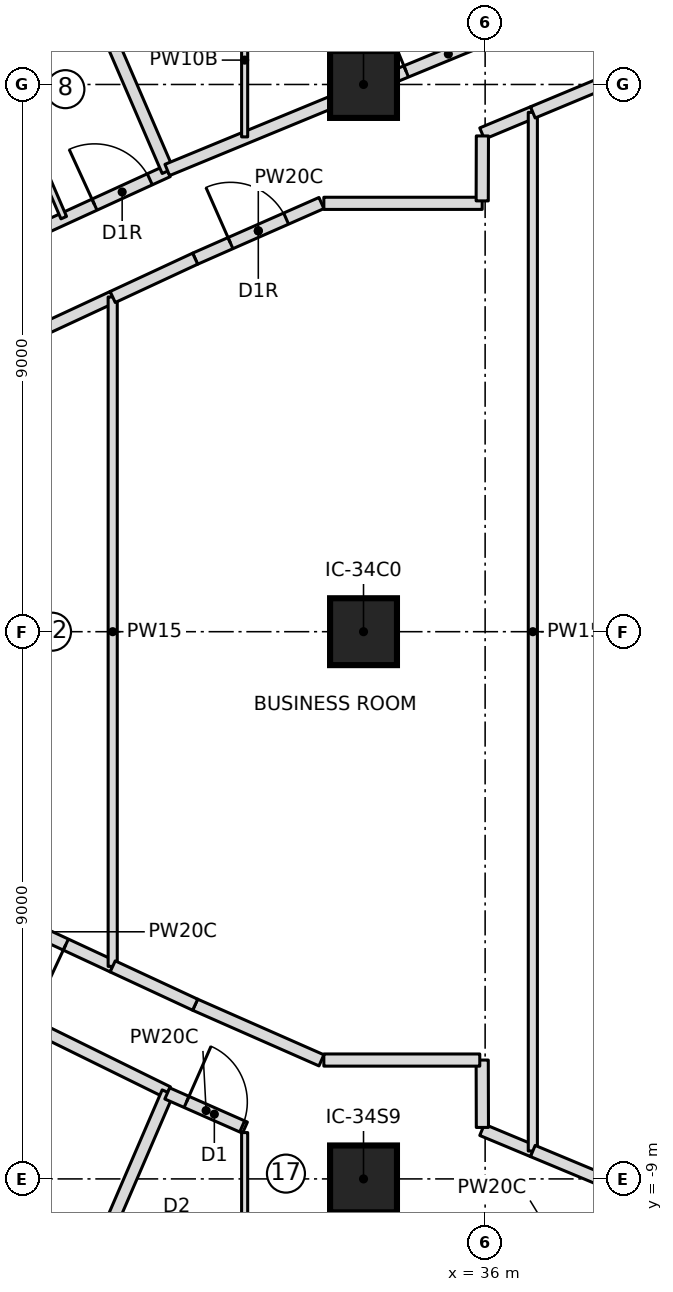
"""IFC4 building model, lengths in metres.
Left out: names, types, materials, properties, quantities, classifications, styles, units other than length and angle.
Written with IfcOpenShell. Run it as: python <this file> out.ifc"""

import sys

from ifc_helpers import new_model, si_unit, direction, frame, frame_2d, origin, origin_2d, place, context, subcontext, project, spatial, rectangle, extrude, element, fill, save


model = new_model("IFC4")
c1 = context("Model", 3, precision=1e-05, world=origin(), true_north=direction((0.0, 1.0)))
c2 = subcontext(c1, "Body", "Model", "MODEL_VIEW")
j1 = project(units=[si_unit("LENGTHUNIT", "METRE"), si_unit("PLANEANGLEUNIT", "RADIAN")], contexts=[c1])
p1 = place(None, origin())
s1 = spatial("IfcSite", under=j1, at=p1, CompositionType="ELEMENT")
p2 = place(p1, origin())
s2 = spatial("IfcBuilding", under=s1, at=p2, CompositionType="ELEMENT")
p3 = place(p2, frame((0.0, 0.0, 147.95)))
s3 = spatial("IfcBuildingStorey", under=s2, at=p3, CompositionType="ELEMENT", Elevation=147.95)
for number, where, z_axis, x_axis in (
    (1, (34.0, -9.0, 0.0), (0.0, 0.0, 1.0), (1.0, 0.0, 0.0)),
    (2, (34.0, 0.0, 0.0), (0.0, 0.0, 1.0), (1.0, 0.0, 0.0)),
    (3, (34.0, 9.0, 0.0), (0.0, 0.0, 1.0), (1.0, 0.0, 0.0)),
):
    element("IfcColumn", number, at=place(p3, frame(where, z_axis=z_axis, x_axis=x_axis)), inside=s3, PredefinedType="COLUMN", context=c2, shape_type="SweptSolid", body=[
        extrude(rectangle(XDim=1.1, YDim=1.1, at=origin_2d()), origin(), (0.0, 0.0, 1.0), 3.55),
    ])
p4 = place(p3, frame((26.803, 5.753, 0.0), z_axis=(0.0, 0.0, 1.0), x_axis=(0.90910092787, 0.416575926987, 0.0)))
e4 = element("IfcWall", 4, at=p4, inside=s3, PredefinedType="PARTITIONING", context=c2, shape_type="SweptSolid", body=[
    extrude(rectangle(XDim=4.375, YDim=0.2, at=frame_2d((2.188, 0.0))), origin(), (0.0, 0.0, 1.0), 3.25),
])
p5 = place(p4, frame((3.05, 0.0, 0.0)))
e5 = element("IfcOpeningElement", 5, at=p5, cuts=e4, PredefinedType="OPENING", context=c2, shape_type="SweptSolid", body=[
    extrude(rectangle(XDim=1.0, YDim=2.1, at=frame_2d((0.5, 1.05))), frame((0.0, 0.11, 0.0), z_axis=(0.0, -1.0, 0.0), x_axis=(1.0, 0.0, 0.0)), (0.0, 0.0, 1.0), 0.22),
])
p6 = place(p3, frame((28.168, 8.902, 0.0), z_axis=(0.0, 0.0, 1.0), x_axis=(0.396000751487, -0.918250186399, 0.0)))
e6 = element("IfcWall", 6, at=p6, inside=s3, PredefinedType="PARTITIONING", context=c2, shape_type="SweptSolid", body=[
    extrude(rectangle(XDim=2.278, YDim=0.1, at=frame_2d((1.139, 0.0))), origin(), (0.0, 0.0, 1.0), 3.25),
])
p7 = place(p3, frame((30.781, 7.575, 0.0), z_axis=(0.0, 0.0, 1.0), x_axis=(-0.396004020147, 0.918248776763, 0.0)))
e7 = element("IfcWall", 7, at=p7, inside=s3, PredefinedType="PARTITIONING", context=c2, shape_type="SweptSolid", body=[
    extrude(rectangle(XDim=7.6, YDim=0.2, at=frame_2d((3.8, 0.0))), origin(), (0.0, 0.0, 1.0), 3.25),
])
p8 = place(p3, frame((30.772, 7.594, 0.0), z_axis=(0.0, 0.0, 1.0), x_axis=(0.924461873383, 0.381274500407, 0.0)))
e8 = element("IfcWall", 8, at=p8, inside=s3, PredefinedType="PARTITIONING", context=c2, shape_type="SweptSolid", body=[
    extrude(rectangle(XDim=13.127, YDim=0.2, at=frame_2d((6.564, 0.0))), origin(), (0.0, 0.0, 1.0), 3.25),
])
p9 = place(p8, frame((4.25, 0.0, 0.0)))
e9 = element("IfcOpeningElement", 9, at=p9, cuts=e8, PredefinedType="OPENING", context=c2, shape_type="SweptSolid", body=[
    extrude(rectangle(XDim=1.5, YDim=2.1, at=frame_2d((0.75, 1.05))), frame((0.0, 0.11, 0.0), z_axis=(0.0, -1.0, 0.0), x_axis=(1.0, 0.0, 0.0)), (0.0, 0.0, 1.0), 0.22),
])
p10 = place(p3, frame((17.95, -1.261, 0.0), z_axis=(0.0, 0.0, 1.0), x_axis=(0.897223022069, -0.441577681353, 0.0)))
e10 = element("IfcWall", 10, at=p10, inside=s3, PredefinedType="PARTITIONING", context=c2, shape_type="SweptSolid", body=[
    extrude(rectangle(XDim=14.3, YDim=0.2, at=frame_2d((7.15, 0.0))), origin(), (0.0, 0.0, 1.0), 3.25),
])
p11 = place(p10, frame((3.05, 0.0, 0.0)))
e11 = element("IfcOpeningElement", 11, at=p11, cuts=e10, PredefinedType="OPENING", context=c2, shape_type="SweptSolid", body=[
    extrude(rectangle(XDim=1.5, YDim=2.1, at=frame_2d((0.75, 1.05))), frame((0.0, 0.11, 0.0), z_axis=(0.0, -1.0, 0.0), x_axis=(1.0, 0.0, 0.0)), (0.0, 0.0, 1.0), 0.22),
])
p12 = place(p3, frame((27.771, -14.554, 0.0), z_axis=(0.0, 0.0, 1.0), x_axis=(0.396004020147, 0.918248776763, 0.0)))
e12 = element("IfcWall", 12, at=p12, inside=s3, PredefinedType="PARTITIONING", context=c2, shape_type="SweptSolid", body=[
    extrude(rectangle(XDim=7.6, YDim=0.2, at=frame_2d((3.8, 0.0))), origin(), (0.0, 0.0, 1.0), 3.25),
])
p13 = place(p3, frame((30.772, -7.594, 0.0), z_axis=(0.0, 0.0, 1.0), x_axis=(0.915155082005, -0.403101942293, 0.0)))
e13 = element("IfcWall", 13, at=p13, inside=s3, PredefinedType="PARTITIONING", context=c2, shape_type="SweptSolid", body=[
    extrude(rectangle(XDim=1.396, YDim=0.2, at=frame_2d((0.698, 0.0))), origin(), (0.0, 0.0, 1.0), 3.25),
])
p14 = place(p13, frame((0.346, 0.0, 0.0)))
e14 = element("IfcOpeningElement", 14, at=p14, cuts=e13, PredefinedType="OPENING", context=c2, shape_type="SweptSolid", body=[
    extrude(rectangle(XDim=1.0, YDim=2.1, at=frame_2d((0.5, 1.05))), frame((0.0, 0.11, 0.0), z_axis=(0.0, -1.0, 0.0), x_axis=(1.0, 0.0, 0.0)), (0.0, 0.0, 1.0), 0.22),
])
p15 = place(p3, frame((29.875, -5.505, 0.0), z_axis=(0.0, 0.0, 1.0), x_axis=(-0.906831253463, 0.421493864419, 0.0)))
e15 = element("IfcWall", 15, at=p15, inside=s3, PredefinedType="PARTITIONING", context=c2, shape_type="SweptSolid", body=[
    extrude(rectangle(XDim=2.7, YDim=0.2, at=frame_2d((1.35, 0.0))), origin(), (0.0, 0.0, 1.0), 3.25),
])
p16 = place(p15, frame((0.85, 0.0, 0.0)))
e16 = element("IfcOpeningElement", 16, at=p16, cuts=e15, PredefinedType="OPENING", context=c2, shape_type="SweptSolid", body=[
    extrude(rectangle(XDim=1.0, YDim=2.1, at=frame_2d((0.5, 1.05))), frame((0.0, 0.11, 0.0), z_axis=(0.0, -1.0, 0.0), x_axis=(1.0, 0.0, 0.0)), (0.0, 0.0, 1.0), 0.22),
])
p17 = place(p3, frame((27.427, 4.367, 0.0), z_axis=(0.0, 0.0, 1.0), x_axis=(0.906831253463, 0.421493864419, 0.0)))
e17 = element("IfcWall", 17, at=p17, inside=s3, PredefinedType="PARTITIONING", context=c2, shape_type="SweptSolid", body=[
    extrude(rectangle(XDim=2.7, YDim=0.2, at=frame_2d((1.35, 0.0))), origin(), (0.0, 0.0, 1.0), 3.25),
])
p18 = place(p3, frame((29.875, -5.505, 0.0), z_axis=(0.0, 0.0, 1.0), x_axis=(0.0, 1.0, 0.0)))
e18 = element("IfcWall", 18, at=p18, inside=s3, PredefinedType="PARTITIONING", context=c2, shape_type="SweptSolid", body=[
    extrude(rectangle(XDim=11.009, YDim=0.15, at=frame_2d((5.505, 0.0))), origin(), (0.0, 0.0, 1.0), 3.25),
])
p19 = place(p3, frame((31.231, 6.135, 0.0), z_axis=(0.0, 0.0, 1.0), x_axis=(0.915102334452, 0.403221672881, 0.0)))
e19 = element("IfcWall", 19, at=p19, inside=s3, PredefinedType="PARTITIONING", context=c2, shape_type="SweptSolid", body=[
    extrude(rectangle(XDim=2.269, YDim=0.2, at=frame_2d((1.135, 0.0))), origin(), (0.0, 0.0, 1.0), 3.25),
])
p20 = place(p19, frame((0.635, 0.0, 0.0)))
e20 = element("IfcOpeningElement", 20, at=p20, cuts=e19, PredefinedType="OPENING", context=c2, shape_type="SweptSolid", body=[
    extrude(rectangle(XDim=1.0, YDim=2.1, at=frame_2d((0.5, 1.05))), frame((0.0, 0.11, 0.0), z_axis=(0.0, -1.0, 0.0), x_axis=(1.0, 0.0, 0.0)), (0.0, 0.0, 1.0), 0.22),
])
for number, where, z_axis, x_axis in (
    (21, (35.95, 8.193, 0.0), (0.0, 0.0, 1.0), (0.923, 0.385, 0.0)),
    (22, (36.784, -8.541, 0.0), (0.0, 0.0, 1.0), (-0.923, 0.385, 0.0)),
):
    element("IfcWall", number, at=place(p3, frame(where, z_axis=z_axis, x_axis=x_axis)), inside=s3, PredefinedType="PARTITIONING", context=c2, shape_type="SweptSolid", body=[
        extrude(rectangle(XDim=0.904, YDim=0.2, at=frame_2d((0.452, 0.0))), origin(), (0.0, 0.0, 1.0), 3.25),
    ])
p21 = place(p3, frame((33.308, -7.05, 0.0), z_axis=(0.0, 0.0, 1.0), x_axis=(-0.915102334452, 0.403221672881, 0.0)))
e23 = element("IfcWall", 23, at=p21, inside=s3, PredefinedType="PARTITIONING", context=c2, shape_type="SweptSolid", body=[
    extrude(rectangle(XDim=2.269, YDim=0.2, at=frame_2d((1.135, 0.0))), origin(), (0.0, 0.0, 1.0), 3.25),
])
for number, where, z_axis, x_axis in (
    (24, (31.231, -6.135, 0.0), (0.0, 0.0, 1.0), (-0.907, 0.421, 0.0)),
    (25, (29.875, 5.505, 0.0), (0.0, 0.0, 1.0), (0.907, 0.421, 0.0)),
):
    element("IfcWall", number, at=place(p3, frame(where, z_axis=z_axis, x_axis=x_axis)), inside=s3, PredefinedType="PARTITIONING", context=c2, shape_type="SweptSolid", body=[
        extrude(rectangle(XDim=1.496, YDim=0.2, at=frame_2d((0.748, 0.0))), origin(), (0.0, 0.0, 1.0), 3.25),
    ])
p22 = place(p3, frame((36.784, -8.541, 0.0), z_axis=(0.0, 0.0, 1.0), x_axis=(0.0, 1.0, 0.0)))
e26 = element("IfcWall", 26, at=p22, inside=s3, PredefinedType="PARTITIONING", context=c2, shape_type="SweptSolid", body=[
    extrude(rectangle(XDim=17.082, YDim=0.15, at=frame_2d((8.541, 0.0))), origin(), (0.0, 0.0, 1.0), 3.25),
])
for number, where, z_axis, x_axis in (
    (27, (38.943, -9.441, 0.0), (0.0, 0.0, 1.0), (-0.923, 0.385, 0.0)),
    (28, (36.784, 8.541, 0.0), (0.0, 0.0, 1.0), (0.923, 0.385, 0.0)),
):
    element("IfcWall", number, at=place(p3, frame(where, z_axis=z_axis, x_axis=x_axis)), inside=s3, PredefinedType="PARTITIONING", context=c2, shape_type="SweptSolid", body=[
        extrude(rectangle(XDim=2.339, YDim=0.2, at=frame_2d((1.169, 0.0))), origin(), (0.0, 0.0, 1.0), 3.25),
    ])
p23 = place(p3, frame((32.045, 10.664, 0.0), z_axis=(0.0, 0.0, 1.0), x_axis=(0.0, -1.0, 0.0)))
e29 = element("IfcWall", 29, at=p23, inside=s3, PredefinedType="PARTITIONING", context=c2, shape_type="SweptSolid", body=[
    extrude(rectangle(XDim=2.526, YDim=0.1, at=frame_2d((1.263, 0.0))), origin(), (0.0, 0.0, 1.0), 3.25),
])
p24 = place(p3, frame((32.045, -8.238, 0.0), z_axis=(0.0, 0.0, 1.0), x_axis=(0.0, -1.0, 0.0)))
e30 = element("IfcWall", 30, at=p24, inside=s3, PredefinedType="PARTITIONING", context=c2, shape_type="SweptSolid", body=[
    extrude(rectangle(XDim=2.426, YDim=0.1, at=frame_2d((1.213, 0.0))), origin(), (0.0, 0.0, 1.0), 3.25),
])
p25 = place(p3, frame((35.955, -8.154, 0.0), z_axis=(0.0, 0.0, 1.0), x_axis=(-0.002643744892, 0.9999965053, 0.0)))
e31 = element("IfcWall", 31, at=p25, inside=s3, PredefinedType="PARTITIONING", context=c2, shape_type="SweptSolid", body=[
    extrude(rectangle(XDim=1.108, YDim=0.2, at=frame_2d((0.554, 0.0))), origin(), (0.0, 0.0, 1.0), 3.25),
])
p26 = place(p3, frame((35.912, -7.045, 0.0), z_axis=(0.0, 0.0, 1.0), x_axis=(-0.999999981873, 0.000190403652, 0.0)))
e32 = element("IfcWall", 32, at=p26, inside=s3, PredefinedType="PARTITIONING", context=c2, shape_type="SweptSolid", body=[
    extrude(rectangle(XDim=2.564, YDim=0.2, at=frame_2d((1.282, 0.0))), origin(), (0.0, 0.0, 1.0), 3.25),
])
p27 = place(p3, frame((33.347, 7.045, 0.0), z_axis=(0.0, 0.0, 1.0), x_axis=(0.999999982426, 0.000187476562, 0.0)))
e33 = element("IfcWall", 33, at=p27, inside=s3, PredefinedType="PARTITIONING", context=c2, shape_type="SweptSolid", body=[
    extrude(rectangle(XDim=2.604, YDim=0.2, at=frame_2d((1.302, 0.0))), origin(), (0.0, 0.0, 1.0), 3.25),
])
p28 = place(p3, frame((35.952, 7.085, 0.0), z_axis=(0.0, 0.0, 1.0), x_axis=(0.002742846825, 0.999996238389, 0.0)))
e34 = element("IfcWall", 34, at=p28, inside=s3, PredefinedType="PARTITIONING", context=c2, shape_type="SweptSolid", body=[
    extrude(rectangle(XDim=1.068, YDim=0.2, at=frame_2d((0.534, 0.0))), origin(), (0.0, 0.0, 1.0), 3.25),
])
p29 = place(p5, origin())
e35 = element("IfcDoor", 35, at=p29, inside=s3, OperationType="SINGLE_SWING_RIGHT", PredefinedType="DOOR", context=c2, shape_type="SweptSolid", body=[
    extrude(rectangle(XDim=1.0, YDim=2.1, at=frame_2d((0.5, 1.05))), frame((0.0, 0.025, 0.0), z_axis=(0.0, -1.0, 0.0), x_axis=(1.0, 0.0, 0.0)), (0.0, 0.0, 1.0), 0.05),
])
fill(e5, e35)
p30 = place(p9, origin())
e36 = element("IfcDoor", 36, at=p30, inside=s3, OperationType="DOUBLE_DOOR_SINGLE_SWING", PredefinedType="DOOR", context=c2, shape_type="SweptSolid", body=[
    extrude(rectangle(XDim=1.5, YDim=2.1, at=frame_2d((0.75, 1.05))), frame((0.0, 0.025, 0.0), z_axis=(0.0, -1.0, 0.0), x_axis=(1.0, 0.0, 0.0)), (0.0, 0.0, 1.0), 0.05),
])
fill(e9, e36)
p31 = place(p14, origin())
e37 = element("IfcDoor", 37, at=p31, inside=s3, OperationType="SINGLE_SWING_LEFT", PredefinedType="DOOR", context=c2, shape_type="SweptSolid", body=[
    extrude(rectangle(XDim=1.0, YDim=2.1, at=frame_2d((0.5, 1.05))), frame((0.0, 0.025, 0.0), z_axis=(0.0, -1.0, 0.0), x_axis=(1.0, 0.0, 0.0)), (0.0, 0.0, 1.0), 0.05),
])
fill(e14, e37)
p32 = place(p16, origin())
e38 = element("IfcDoor", 38, at=p32, inside=s3, OperationType="SINGLE_SWING_LEFT", PredefinedType="DOOR", context=c2, shape_type="SweptSolid", body=[
    extrude(rectangle(XDim=1.0, YDim=2.1, at=frame_2d((0.5, 1.05))), frame((0.0, 0.025, 0.0), z_axis=(0.0, -1.0, 0.0), x_axis=(1.0, 0.0, 0.0)), (0.0, 0.0, 1.0), 0.05),
])
fill(e16, e38)
p33 = place(p20, origin())
e39 = element("IfcDoor", 39, at=p33, inside=s3, OperationType="SINGLE_SWING_RIGHT", PredefinedType="DOOR", context=c2, shape_type="SweptSolid", body=[
    extrude(rectangle(XDim=1.0, YDim=2.1, at=frame_2d((0.5, 1.05))), frame((0.0, 0.025, 0.0), z_axis=(0.0, -1.0, 0.0), x_axis=(1.0, 0.0, 0.0)), (0.0, 0.0, 1.0), 0.05),
])
fill(e20, e39)
save(model, sys.argv[1])
